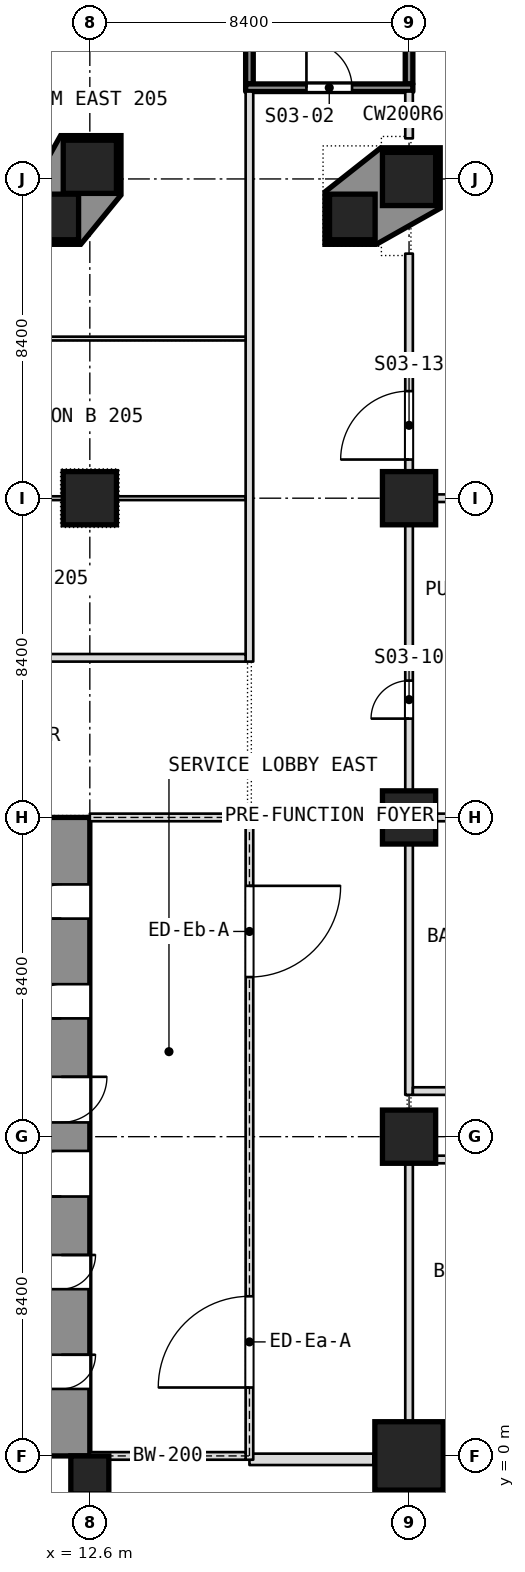
"""IFC4 building model, lengths in metres.
Left out: names, types, materials, properties, quantities, classifications, styles, units other than length and angle.
Written with IfcOpenShell. Run it as: python <this file> out.ifc"""

import sys

from ifc_helpers import new_model, si_unit, direction, frame, frame_2d, origin, origin_2d, place, context, subcontext, project, spatial, polyline, rectangle, outline, extrude, element, fill, save


model = new_model("IFC4")
c1 = context("Model", 3, precision=1e-05, world=origin(), true_north=direction((0.0, 1.0)))
c2 = subcontext(c1, "Body", "Model", "MODEL_VIEW")
j1 = project(units=[si_unit("LENGTHUNIT", "METRE"), si_unit("PLANEANGLEUNIT", "RADIAN")], contexts=[c1])
p1 = place(None, origin())
s1 = spatial("IfcSite", under=j1, at=p1, CompositionType="ELEMENT")
p2 = place(p1, origin())
s2 = spatial("IfcBuilding", under=s1, at=p2, CompositionType="ELEMENT")
p3 = place(p2, frame((0.0, 0.0, 13.0)))
s3 = spatial("IfcBuildingStorey", under=s2, at=p3, CompositionType="ELEMENT", Elevation=13.0)
p4 = place(p3, frame((21.0, 0.0, 0.0), z_axis=(0.0, 0.0, 1.0), x_axis=(1.0, 0.0, 0.0)))
e1 = element("IfcColumn", 1, at=p4, inside=s3, PredefinedType="COLUMN", context=c2, shape_type="SweptSolid", body=[
    extrude(rectangle(XDim=1.8, YDim=1.8, at=origin_2d()), origin(), (0.0, 0.0, 1.0), 8.0),
])
for number, where, z_axis, x_axis in (
    (2, (21.0, 8.4, 0.0), (0.0, 0.0, 1.0), (1.0, 0.0, 0.0)),
    (3, (21.0, 16.8, 0.0), (0.0, 0.0, 1.0), (1.0, 0.0, 0.0)),
    (4, (12.6, 25.2, 0.0), (0.0, 0.0, 1.0), (1.0, 0.0, 0.0)),
    (5, (21.0, 25.2, 0.0), (0.0, 0.0, 1.0), (1.0, 0.0, 0.0)),
    (6, (12.6, 33.92, 0.0), (0.0, 0.0, 1.0), (1.0, 0.0, 0.0)),
    (7, (21.0, 33.6, 0.0), (0.0, 0.0, 1.0), (1.0, 0.0, 0.0)),
):
    element("IfcColumn", number, at=place(p3, frame(where, z_axis=z_axis, x_axis=x_axis)), inside=s3, PredefinedType="COLUMN", context=c2, shape_type="SweptSolid", body=[
        extrude(rectangle(XDim=1.4, YDim=1.4, at=origin_2d()), origin(), (0.0, 0.0, 1.0), 8.0),
    ])
p5 = place(p3, frame((11.85, 0.0, 0.0), z_axis=(0.0, 0.0, 1.0), x_axis=(0.0, 1.0, 0.0)))
e8 = element("IfcWall", 8, at=p5, inside=s3, PredefinedType="SHEAR", context=c2, shape_type="SweptSolid", body=[
    extrude(rectangle(XDim=16.8, YDim=1.5, at=frame_2d((8.4, 0.0))), origin(), (0.0, 0.0, 1.0), 8.0),
])
p6 = place(p5, frame((1.762, 0.0, 0.0)))
e9 = element("IfcOpeningElement", 9, at=p6, cuts=e8, PredefinedType="OPENING", context=c2, shape_type="SweptSolid", body=[
    extrude(rectangle(XDim=0.9, YDim=2.1, at=frame_2d((0.45, 1.05))), frame((0.0, 0.75, 0.0), z_axis=(0.0, -1.0, 0.0), x_axis=(1.0, 0.0, 0.0)), (0.0, 0.0, 1.0), 1.5),
])
p7 = place(p5, frame((4.387, 0.0, 0.0)))
e10 = element("IfcOpeningElement", 10, at=p7, cuts=e8, PredefinedType="OPENING", context=c2, shape_type="SweptSolid", body=[
    extrude(rectangle(XDim=0.9, YDim=2.1, at=frame_2d((0.45, 1.05))), frame((0.0, 0.75, 0.0), z_axis=(0.0, -1.0, 0.0), x_axis=(1.0, 0.0, 0.0)), (0.0, 0.0, 1.0), 1.5),
])
p8 = place(p5, frame((6.825, 0.0, 0.0)))
e11 = element("IfcOpeningElement", 11, at=p8, cuts=e8, PredefinedType="OPENING", context=c2, shape_type="SweptSolid", body=[
    extrude(rectangle(XDim=1.2, YDim=2.1, at=frame_2d((0.6, 1.05))), frame((0.0, 0.75, 0.0), z_axis=(0.0, -1.0, 0.0), x_axis=(1.0, 0.0, 0.0)), (0.0, 0.0, 1.0), 1.5),
])
p9 = place(p5, frame((14.137, 0.0, 0.0)))
e12 = element("IfcOpeningElement", 12, at=p9, cuts=e8, PredefinedType="OPENING", context=c2, shape_type="SweptSolid", body=[
    extrude(rectangle(XDim=0.9, YDim=2.1, at=frame_2d((0.45, 1.05))), frame((0.0, 0.75, 0.0), z_axis=(0.0, -1.0, 0.0), x_axis=(1.0, 0.0, 0.0)), (0.0, 0.0, 1.0), 1.5),
])
p10 = place(p5, frame((11.512, 0.0, 0.0)))
e13 = element("IfcOpeningElement", 13, at=p10, cuts=e8, PredefinedType="OPENING", context=c2, shape_type="SweptSolid", body=[
    extrude(rectangle(XDim=0.9, YDim=2.1, at=frame_2d((0.45, 1.05))), frame((0.0, 0.75, 0.0), z_axis=(0.0, -1.0, 0.0), x_axis=(1.0, 0.0, 0.0)), (0.0, 0.0, 1.0), 1.5),
])
p11 = place(p5, frame((8.775, 0.0, 0.0)))
e14 = element("IfcOpeningElement", 14, at=p11, cuts=e8, PredefinedType="OPENING", context=c2, shape_type="SweptSolid", body=[
    extrude(rectangle(XDim=1.2, YDim=2.1, at=frame_2d((0.6, 1.05))), frame((0.0, 0.75, 0.0), z_axis=(0.0, -1.0, 0.0), x_axis=(1.0, 0.0, 0.0)), (0.0, 0.0, 1.0), 1.5),
])
for number, where, z_axis, x_axis in (
    (15, (11.704, 32.6, 0.0), (0.0, 0.0, 1.0), (1.0, 0.0, 0.0)),
    (16, (19.507, 32.6, 0.0), (0.0, 0.0, 1.0), (1.0, 0.0, 0.0)),
):
    element("IfcColumn", number, at=place(p3, frame(where, z_axis=z_axis, x_axis=x_axis)), inside=s3, PredefinedType="COLUMN", context=c2, shape_type="SweptSolid", body=[
        extrude(rectangle(XDim=1.2, YDim=1.2, at=origin_2d()), origin(), (0.0, 0.0, 1.0), 8.0),
    ])
p12 = place(p3, frame((12.6, -0.5, 0.0), z_axis=(0.0, 0.0, 1.0), x_axis=(1.0, 0.0, 0.0)))
e17 = element("IfcColumn", 17, at=p12, inside=s3, PredefinedType="COLUMN", context=c2, shape_type="SweptSolid", body=[
    extrude(rectangle(XDim=1.0, YDim=1.0, at=origin_2d()), origin(), (0.0, 0.0, 1.0), 8.0),
])
p13 = place(p3, frame((21.0, -0.3, 0.0), z_axis=(0.0, 0.0, 1.0), x_axis=(0.0, 1.0, 0.0)))
e18 = element("IfcWall", 18, at=p13, inside=s3, PredefinedType="PARTITIONING", context=c2, shape_type="SweptSolid", body=[
    extrude(rectangle(XDim=8.2, YDim=0.2, at=frame_2d((4.1, 0.0))), origin(), (0.0, 0.0, 1.0), 7.68),
])
p14 = place(p3, frame((21.0, 9.5, 0.0), z_axis=(0.0, 0.0, 1.0), x_axis=(0.0, 1.0, 0.0)))
e19 = element("IfcWall", 19, at=p14, inside=s3, PredefinedType="PARTITIONING", context=c2, shape_type="SweptSolid", body=[
    extrude(rectangle(XDim=22.135, YDim=0.2, at=frame_2d((11.067, 0.0))), origin(), (0.0, 0.0, 1.0), 7.68),
])
p15 = place(p14, frame((9.9, 0.0, 0.0)))
e20 = element("IfcOpeningElement", 20, at=p15, cuts=e19, PredefinedType="OPENING", context=c2, shape_type="SweptSolid", body=[
    extrude(rectangle(XDim=1.0, YDim=2.1, at=frame_2d((0.5, 1.05))), frame((0.0, 0.1, 0.0), z_axis=(0.0, -1.0, 0.0), x_axis=(1.0, 0.0, 0.0)), (0.0, 0.0, 1.0), 0.2),
])
p16 = place(p14, frame((16.717, 0.0, 0.0)))
e21 = element("IfcOpeningElement", 21, at=p16, cuts=e19, PredefinedType="OPENING", context=c2, shape_type="SweptSolid", body=[
    extrude(rectangle(XDim=1.8, YDim=2.1, at=frame_2d((0.9, 1.05))), frame((0.0, 0.1, 0.0), z_axis=(0.0, -1.0, 0.0), x_axis=(1.0, 0.0, 0.0)), (0.0, 0.0, 1.0), 0.2),
])
p17 = place(p3, frame((21.0, 34.668, 0.0), z_axis=(0.0, 0.0, 1.0), x_axis=(0.0, 1.0, 0.0)))
e22 = element("IfcWall", 22, at=p17, inside=s3, PredefinedType="PARTITIONING", context=c2, shape_type="SweptSolid", body=[
    extrude(rectangle(XDim=1.232, YDim=0.2, at=frame_2d((0.616, 0.0))), origin(), (0.0, 0.0, 1.0), 7.68),
])
p18 = place(p3, frame((21.0, 36.1, 0.0), z_axis=(0.0, 0.0, 1.0), x_axis=(0.0, 1.0, 0.0)))
e23 = element("IfcWall", 23, at=p18, inside=s3, PredefinedType="PARTITIONING", context=c2, shape_type="SweptSolid", body=[
    extrude(rectangle(XDim=6.2, YDim=0.2, at=frame_2d((3.1, 0.0))), origin(), (0.0, 0.0, 1.0), 7.68),
])
p19 = place(p3, frame((16.8, 20.9, 0.0), z_axis=(0.0, 0.0, 1.0), x_axis=(0.0, 1.0, 0.0)))
e24 = element("IfcWall", 24, at=p19, inside=s3, PredefinedType="PARTITIONING", context=c2, shape_type="SweptSolid", body=[
    extrude(rectangle(XDim=15.0, YDim=0.2, at=frame_2d((7.5, 0.0))), origin(), (0.0, 0.0, 1.0), 7.68),
])
p20 = place(p3, frame((16.8, 36.1, 0.0), z_axis=(0.0, 0.0, 1.0), x_axis=(0.0, 1.0, 0.0)))
e25 = element("IfcWall", 25, at=p20, inside=s3, PredefinedType="PARTITIONING", context=c2, shape_type="SweptSolid", body=[
    extrude(rectangle(XDim=5.84, YDim=0.2, at=frame_2d((2.92, 0.0))), origin(), (0.0, 0.0, 1.0), 7.68),
])
p21 = place(p3, frame((21.1, 7.8, 0.0), z_axis=(0.0, 0.0, 1.0), x_axis=(1.0, 0.0, 0.0)))
e26 = element("IfcWall", 26, at=p21, inside=s3, PredefinedType="PARTITIONING", context=c2, shape_type="SweptSolid", body=[
    extrude(rectangle(XDim=17.0, YDim=0.2, at=frame_2d((8.5, 0.0))), origin(), (0.0, 0.0, 1.0), 7.68),
])
p22 = place(p21, frame((4.875, 0.0, 0.0)))
e27 = element("IfcOpeningElement", 27, at=p22, cuts=e26, PredefinedType="OPENING", context=c2, shape_type="SweptSolid", body=[
    extrude(rectangle(XDim=1.0, YDim=2.1, at=frame_2d((0.5, 1.05))), frame((0.0, 0.1, 0.0), z_axis=(0.0, -1.0, 0.0), x_axis=(1.0, 0.0, 0.0)), (0.0, 0.0, 1.0), 0.2),
])
p23 = place(p3, frame((21.1, 9.6, 0.0), z_axis=(0.0, 0.0, 1.0), x_axis=(1.0, 0.0, 0.0)))
e28 = element("IfcWall", 28, at=p23, inside=s3, PredefinedType="PARTITIONING", context=c2, shape_type="SweptSolid", body=[
    extrude(rectangle(XDim=6.3, YDim=0.2, at=frame_2d((3.15, 0.0))), origin(), (0.0, 0.0, 1.0), 7.68),
])
p24 = place(p23, frame((2.65, 0.0, 0.0)))
e29 = element("IfcOpeningElement", 29, at=p24, cuts=e28, PredefinedType="OPENING", context=c2, shape_type="SweptSolid", body=[
    extrude(rectangle(XDim=1.0, YDim=2.1, at=frame_2d((0.5, 1.05))), frame((0.0, 0.1, 0.0), z_axis=(0.0, -1.0, 0.0), x_axis=(1.0, 0.0, 0.0)), (0.0, 0.0, 1.0), 0.2),
])
p25 = place(p3, frame((21.1, 16.8, 0.0), z_axis=(0.0, 0.0, 1.0), x_axis=(1.0, 0.0, 0.0)))
e30 = element("IfcWall", 30, at=p25, inside=s3, PredefinedType="PARTITIONING", context=c2, shape_type="SweptSolid", body=[
    extrude(rectangle(XDim=6.53, YDim=0.2, at=frame_2d((3.265, 0.0))), origin(), (0.0, 0.0, 1.0), 7.68),
])
p26 = place(p3, frame((-16.7, 21.0, 0.0), z_axis=(0.0, 0.0, 1.0), x_axis=(1.0, 0.0, 0.0)))
e31 = element("IfcWall", 31, at=p26, inside=s3, PredefinedType="PARTITIONING", context=c2, shape_type="SweptSolid", body=[
    extrude(rectangle(XDim=33.4, YDim=0.2, at=frame_2d((16.7, 0.0))), origin(), (0.0, 0.0, 1.0), 7.68),
])
p27 = place(p26, frame((15.8, 0.0, 0.0)))
e32 = element("IfcOpeningElement", 32, at=p27, cuts=e31, PredefinedType="OPENING", context=c2, shape_type="SweptSolid", body=[
    extrude(rectangle(XDim=1.8, YDim=2.1, at=frame_2d((0.9, 1.05))), frame((0.0, 0.1, 0.0), z_axis=(0.0, -1.0, 0.0), x_axis=(1.0, 0.0, 0.0)), (0.0, 0.0, 1.0), 0.2),
])
p28 = place(p3, frame((4.92, 25.2, 0.0), z_axis=(0.0, 0.0, 1.0), x_axis=(1.0, 0.0, 0.0)))
e33 = element("IfcWall", 33, at=p28, inside=s3, PredefinedType="PARTITIONING", context=c2, shape_type="SweptSolid", body=[
    extrude(rectangle(XDim=6.96, YDim=0.1, at=frame_2d((3.48, 0.0))), origin(), (0.0, 0.0, 1.0), 7.68),
])
p29 = place(p3, frame((13.32, 25.2, 0.0), z_axis=(0.0, 0.0, 1.0), x_axis=(1.0, 0.0, 0.0)))
e34 = element("IfcWall", 34, at=p29, inside=s3, PredefinedType="PARTITIONING", context=c2, shape_type="SweptSolid", body=[
    extrude(rectangle(XDim=3.38, YDim=0.1, at=frame_2d((1.69, 0.0))), origin(), (0.0, 0.0, 1.0), 7.68),
])
p30 = place(p3, frame((21.1, 25.2, 0.0), z_axis=(0.0, 0.0, 1.0), x_axis=(1.0, 0.0, 0.0)))
e35 = element("IfcWall", 35, at=p30, inside=s3, PredefinedType="PARTITIONING", context=c2, shape_type="SweptSolid", body=[
    extrude(rectangle(XDim=6.737, YDim=0.2, at=frame_2d((3.368, 0.0))), origin(), (0.0, 0.0, 1.0), 7.68),
])
p31 = place(p3, frame((-16.7, 29.4, 0.0), z_axis=(0.0, 0.0, 1.0), x_axis=(1.0, 0.0, 0.0)))
e36 = element("IfcWall", 36, at=p31, inside=s3, PredefinedType="PARTITIONING", context=c2, shape_type="SweptSolid", body=[
    extrude(rectangle(XDim=33.4, YDim=0.1, at=frame_2d((16.7, 0.0))), origin(), (0.0, 0.0, 1.0), 7.68),
])
p32 = place(p31, frame((16.2, 0.0, 0.0)))
e37 = element("IfcOpeningElement", 37, at=p32, cuts=e36, PredefinedType="OPENING", context=c2, shape_type="SweptSolid", body=[
    extrude(rectangle(XDim=1.0, YDim=2.1, at=frame_2d((0.5, 1.05))), frame((0.0, 0.05, 0.0), z_axis=(0.0, -1.0, 0.0), x_axis=(1.0, 0.0, 0.0)), (0.0, 0.0, 1.0), 0.1),
])
p33 = place(p3, frame((16.7, 36.0, 0.0), z_axis=(0.0, 0.0, 1.0), x_axis=(1.0, 0.0, 0.0)))
e38 = element("IfcWall", 38, at=p33, inside=s3, PredefinedType="PARTITIONING", context=c2, shape_type="SweptSolid", body=[
    extrude(rectangle(XDim=4.4, YDim=0.2, at=frame_2d((2.2, 0.0))), origin(), (0.0, 0.0, 1.0), 7.68),
])
p34 = place(p33, frame((1.6, 0.0, 0.0)))
e39 = element("IfcOpeningElement", 39, at=p34, cuts=e38, PredefinedType="OPENING", context=c2, shape_type="SweptSolid", body=[
    extrude(rectangle(XDim=1.2, YDim=2.1, at=frame_2d((0.6, 1.05))), frame((0.0, 0.1, 0.0), z_axis=(0.0, -1.0, 0.0), x_axis=(1.0, 0.0, 0.0)), (0.0, 0.0, 1.0), 0.2),
])
p35 = place(p3, frame((16.8, -0.09, 0.0), z_axis=(0.0, 0.0, 1.0), x_axis=(1.0, 0.0, 0.0)))
e40 = element("IfcWall", 40, at=p35, inside=s3, PredefinedType="NOTDEFINED", context=c2, shape_type="SweptSolid", body=[
    extrude(rectangle(XDim=3.26, YDim=0.3, at=frame_2d((1.63, 0.0))), origin(), (0.0, 0.0, 1.0), 8.0),
])
p36 = place(p3, frame((21.94, -0.09, 0.0), z_axis=(0.0, 0.0, 1.0), x_axis=(1.0, 0.0, 0.0)))
e41 = element("IfcWall", 41, at=p36, inside=s3, PredefinedType="NOTDEFINED", context=c2, shape_type="SweptSolid", body=[
    extrude(rectangle(XDim=4.483, YDim=0.3, at=frame_2d((2.242, 0.0))), origin(), (0.0, 0.0, 1.0), 6.78),
])
p37 = place(p3, frame((16.8, -0.1, 0.0), z_axis=(0.0, 0.0, 1.0), x_axis=(0.0, 1.0, 0.0)))
e42 = element("IfcWall", 42, at=p37, inside=s3, PredefinedType="PARTITIONING", context=c2, shape_type="SweptSolid", body=[
    extrude(rectangle(XDim=17.0, YDim=0.2, at=frame_2d((8.5, 0.0))), origin(), (0.0, 0.0, 1.0), 7.78),
])
p38 = place(p37, frame((1.9, 0.0, 0.0)))
e43 = element("IfcOpeningElement", 43, at=p38, cuts=e42, PredefinedType="OPENING", context=c2, shape_type="SweptSolid", body=[
    extrude(rectangle(XDim=2.4, YDim=2.1, at=frame_2d((1.2, 1.05))), frame((0.0, 0.1, 0.0), z_axis=(0.0, -1.0, 0.0), x_axis=(1.0, 0.0, 0.0)), (0.0, 0.0, 1.0), 0.2),
])
p39 = place(p37, frame((12.7, 0.0, 0.0)))
e44 = element("IfcOpeningElement", 44, at=p39, cuts=e42, PredefinedType="OPENING", context=c2, shape_type="SweptSolid", body=[
    extrude(rectangle(XDim=2.4, YDim=2.1, at=frame_2d((1.2, 1.05))), frame((0.0, 0.1, 0.0), z_axis=(0.0, -1.0, 0.0), x_axis=(1.0, 0.0, 0.0)), (0.0, 0.0, 1.0), 0.2),
])
for number, where, z_axis, x_axis in (
    (45, (12.6, 0.0, 0.0), (0.0, 0.0, 1.0), (1.0, 0.0, 0.0)),
    (46, (12.6, 16.8, 0.0), (0.0, 0.0, 1.0), (1.0, 0.0, 0.0)),
):
    element("IfcWall", number, at=place(p3, frame(where, z_axis=z_axis, x_axis=x_axis)), inside=s3, PredefinedType="PARTITIONING", context=c2, shape_type="SweptSolid", body=[
        extrude(rectangle(XDim=4.1, YDim=0.2, at=frame_2d((2.05, 0.0))), origin(), (0.0, 0.0, 1.0), 7.78),
    ])
p40 = place(p3, origin())
e47 = element("IfcWall", 47, at=p40, inside=s3, PredefinedType="SOLIDWALL", context=c2, shape_type="SweptSolid", body=[
    extrude(outline(polyline([(10.984, 33.231), (11.83, 34.74), (13.42, 34.74), (13.42, 33.177), (12.361, 31.88), (10.984, 31.88), (10.984, 33.231)]), holes=[polyline([(11.9, 33.22), (13.3, 33.22), (13.3, 34.62), (11.9, 34.62), (11.9, 33.22)]), polyline([(11.104, 32.0), (12.304, 32.0), (12.304, 33.2), (11.104, 33.2), (11.104, 32.0)])]), origin(), (0.0, 0.0, 1.0), 8.0),
])
p41 = place(p3, origin())
e48 = element("IfcWall", 48, at=p41, inside=s3, PredefinedType="SOLIDWALL", context=c2, shape_type="SweptSolid", body=[
    extrude(outline(polyline([(20.258, 34.42), (21.82, 34.42), (21.82, 32.83), (20.138, 31.88), (18.787, 31.88), (18.787, 33.258), (20.258, 34.42)]), holes=[polyline([(21.7, 32.9), (21.7, 34.3), (20.3, 34.3), (20.3, 32.9), (21.7, 32.9)]), polyline([(20.107, 32.0), (20.107, 33.2), (18.907, 33.2), (18.907, 32.0), (20.107, 32.0)])]), origin(), (0.0, 0.0, 1.0), 8.0),
])
p42 = place(p34, origin())
e49 = element("IfcDoor", 49, at=p42, inside=s3, OperationType="SINGLE_SWING_LEFT", PredefinedType="DOOR", context=c2, shape_type="SweptSolid", body=[
    extrude(rectangle(XDim=1.2, YDim=2.1, at=frame_2d((0.6, 1.05))), frame((0.0, 0.025, 0.0), z_axis=(0.0, -1.0, 0.0), x_axis=(1.0, 0.0, 0.0)), (0.0, 0.0, 1.0), 0.05),
])
fill(e39, e49)
p43 = place(p15, origin())
e50 = element("IfcDoor", 50, at=p43, inside=s3, OperationType="SINGLE_SWING_RIGHT", PredefinedType="DOOR", context=c2, shape_type="SweptSolid", body=[
    extrude(rectangle(XDim=1.0, YDim=2.1, at=frame_2d((0.5, 1.05))), frame((0.0, 0.025, 0.0), z_axis=(0.0, -1.0, 0.0), x_axis=(1.0, 0.0, 0.0)), (0.0, 0.0, 1.0), 0.05),
])
fill(e20, e50)
p44 = place(p16, origin())
e51 = element("IfcDoor", 51, at=p44, inside=s3, OperationType="DOUBLE_DOOR_SINGLE_SWING", PredefinedType="DOOR", context=c2, shape_type="SweptSolid", body=[
    extrude(rectangle(XDim=1.8, YDim=2.1, at=frame_2d((0.9, 1.05))), frame((0.0, 0.025, 0.0), z_axis=(0.0, -1.0, 0.0), x_axis=(1.0, 0.0, 0.0)), (0.0, 0.0, 1.0), 0.05),
])
fill(e21, e51)
p45 = place(p6, origin())
e52 = element("IfcDoor", 52, at=p45, inside=s3, OperationType="SINGLE_SWING_LEFT", PredefinedType="DOOR", context=c2, shape_type="SweptSolid", body=[
    extrude(rectangle(XDim=0.9, YDim=2.1, at=frame_2d((0.45, 1.05))), frame((0.0, 0.025, 0.0), z_axis=(0.0, -1.0, 0.0), x_axis=(1.0, 0.0, 0.0)), (0.0, 0.0, 1.0), 0.05),
])
fill(e9, e52)
p46 = place(p7, origin())
e53 = element("IfcDoor", 53, at=p46, inside=s3, OperationType="SINGLE_SWING_LEFT", PredefinedType="DOOR", context=c2, shape_type="SweptSolid", body=[
    extrude(rectangle(XDim=0.9, YDim=2.1, at=frame_2d((0.45, 1.05))), frame((0.0, 0.025, 0.0), z_axis=(0.0, -1.0, 0.0), x_axis=(1.0, 0.0, 0.0)), (0.0, 0.0, 1.0), 0.05),
])
fill(e10, e53)
p47 = place(p8, origin())
e54 = element("IfcDoor", 54, at=p47, inside=s3, OperationType="SINGLE_SWING_LEFT", PredefinedType="DOOR", context=c2, shape_type="SweptSolid", body=[
    extrude(rectangle(XDim=1.2, YDim=2.1, at=frame_2d((0.6, 1.05))), frame((0.0, 0.025, 0.0), z_axis=(0.0, -1.0, 0.0), x_axis=(1.0, 0.0, 0.0)), (0.0, 0.0, 1.0), 0.05),
])
fill(e11, e54)
p48 = place(p9, origin())
e55 = element("IfcDoor", 55, at=p48, inside=s3, OperationType="SINGLE_SWING_LEFT", PredefinedType="DOOR", context=c2, shape_type="SweptSolid", body=[
    extrude(rectangle(XDim=0.9, YDim=2.1, at=frame_2d((0.45, 1.05))), frame((0.0, 0.025, 0.0), z_axis=(0.0, -1.0, 0.0), x_axis=(1.0, 0.0, 0.0)), (0.0, 0.0, 1.0), 0.05),
])
fill(e12, e55)
p49 = place(p10, origin())
e56 = element("IfcDoor", 56, at=p49, inside=s3, OperationType="SINGLE_SWING_LEFT", PredefinedType="DOOR", context=c2, shape_type="SweptSolid", body=[
    extrude(rectangle(XDim=0.9, YDim=2.1, at=frame_2d((0.45, 1.05))), frame((0.0, 0.025, 0.0), z_axis=(0.0, -1.0, 0.0), x_axis=(1.0, 0.0, 0.0)), (0.0, 0.0, 1.0), 0.05),
])
fill(e13, e56)
p50 = place(p11, origin())
e57 = element("IfcDoor", 57, at=p50, inside=s3, OperationType="SINGLE_SWING_LEFT", PredefinedType="DOOR", context=c2, shape_type="SweptSolid", body=[
    extrude(rectangle(XDim=1.2, YDim=2.1, at=frame_2d((0.6, 1.05))), frame((0.0, 0.025, 0.0), z_axis=(0.0, -1.0, 0.0), x_axis=(1.0, 0.0, 0.0)), (0.0, 0.0, 1.0), 0.05),
])
fill(e14, e57)
p51 = place(p38, origin())
e58 = element("IfcDoor", 58, at=p51, inside=s3, OperationType="DOUBLE_DOOR_SINGLE_SWING", PredefinedType="DOOR", context=c2, shape_type="SweptSolid", body=[
    extrude(rectangle(XDim=2.4, YDim=2.1, at=frame_2d((1.2, 1.05))), frame((0.0, 0.025, 0.0), z_axis=(0.0, -1.0, 0.0), x_axis=(1.0, 0.0, 0.0)), (0.0, 0.0, 1.0), 0.05),
])
fill(e43, e58)
p52 = place(p39, origin())
e59 = element("IfcDoor", 59, at=p52, inside=s3, OperationType="DOUBLE_DOOR_SINGLE_SWING", PredefinedType="DOOR", context=c2, shape_type="SweptSolid", body=[
    extrude(rectangle(XDim=2.4, YDim=2.1, at=frame_2d((1.2, 1.05))), frame((0.0, 0.025, 0.0), z_axis=(0.0, -1.0, 0.0), x_axis=(1.0, 0.0, 0.0)), (0.0, 0.0, 1.0), 0.05),
])
fill(e44, e59)
save(model, sys.argv[1])
